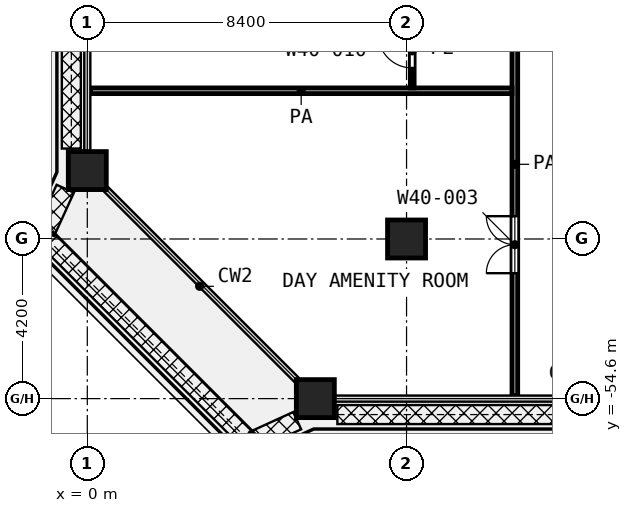
"""IFC4 building model, lengths in metres.
Left out: names, types, materials, properties, quantities, classifications, styles, units other than length and angle.
Written with IfcOpenShell. Run it as: python <this file> out.ifc"""

import sys

from ifc_helpers import new_model, si_unit, direction, frame, frame_2d, origin, origin_2d, place, context, subcontext, project, spatial, rectangle, extrude, element, fill, save


model = new_model("IFC4")
c1 = context("Model", 3, precision=1e-05, world=origin(), true_north=direction((0.0, 1.0)))
c2 = subcontext(c1, "Body", "Model", "MODEL_VIEW")
j1 = project(units=[si_unit("LENGTHUNIT", "METRE"), si_unit("PLANEANGLEUNIT", "RADIAN")], contexts=[c1])
p1 = place(None, origin())
s1 = spatial("IfcSite", under=j1, at=p1, CompositionType="ELEMENT")
p2 = place(p1, origin())
s2 = spatial("IfcBuilding", under=s1, at=p2, CompositionType="ELEMENT")
p3 = place(p2, frame((0.0, 0.0, 196.2)))
s3 = spatial("IfcBuildingStorey", under=s2, at=p3, CompositionType="ELEMENT", Elevation=196.2)
for number, where, z_axis, x_axis in (
    (1, (0.0, -48.6, 0.0), (0.0, 0.0, 1.0), (1.0, 0.0, 0.0)),
    (2, (8.4, -50.4, 0.0), (0.0, 0.0, 1.0), (1.0, 0.0, 0.0)),
    (3, (6.0, -54.6, 0.0), (0.0, 0.0, 1.0), (1.0, 0.0, 0.0)),
):
    element("IfcColumn", number, at=place(p3, frame(where, z_axis=z_axis, x_axis=x_axis)), inside=s3, PredefinedType="COLUMN", context=c2, shape_type="SweptSolid", body=[
        extrude(rectangle(XDim=1.0, YDim=1.0, at=origin_2d()), origin(), (0.0, 0.0, 1.0), 4.2),
    ])
p4 = place(p3, frame((8.55, -46.425, 0.0), z_axis=(0.0, 0.0, 1.0), x_axis=(0.0, 1.0, 0.0)))
e4 = element("IfcWall", 4, at=p4, inside=s3, PredefinedType="PARTITIONING", context=c2, shape_type="SweptSolid", body=[
    extrude(rectangle(XDim=2.025, YDim=0.1, at=frame_2d((1.013, 0.0))), origin(), (0.0, 0.0, 1.0), 3.6),
])
p5 = place(p4, frame((0.525, 0.0, 0.0)))
e5 = element("IfcOpeningElement", 5, at=p5, cuts=e4, PredefinedType="OPENING", context=c2, shape_type="SweptSolid", body=[
    extrude(rectangle(XDim=0.9, YDim=2.1, at=frame_2d((0.45, 1.05))), frame((0.0, 0.06, 0.0), z_axis=(0.0, -1.0, 0.0), x_axis=(1.0, 0.0, 0.0)), (0.0, 0.0, 1.0), 0.12),
])
p6 = place(p3, frame((0.08, -46.5, 0.0), z_axis=(0.0, 0.0, 1.0), x_axis=(1.0, 0.0, 0.0)))
e6 = element("IfcWall", 6, at=p6, inside=s3, PredefinedType="PARTITIONING", context=c2, shape_type="SweptSolid", body=[
    extrude(rectangle(XDim=11.095, YDim=0.15, at=frame_2d((5.547, 0.0))), origin(), (0.0, 0.0, 1.0), 3.6),
])
p7 = place(p3, frame((11.25, -54.52, 0.0), z_axis=(0.0, 0.0, 1.0), x_axis=(0.0, 1.0, 0.0)))
e7 = element("IfcWall", 7, at=p7, inside=s3, PredefinedType="PARTITIONING", context=c2, shape_type="SweptSolid", body=[
    extrude(rectangle(XDim=12.17, YDim=0.15, at=frame_2d((6.085, 0.0))), origin(), (0.0, 0.0, 1.0), 3.6),
])
p8 = place(p7, frame((3.22, 0.0, 0.0)))
e8 = element("IfcOpeningElement", 8, at=p8, cuts=e7, PredefinedType="OPENING", context=c2, shape_type="SweptSolid", body=[
    extrude(rectangle(XDim=1.5, YDim=2.1, at=frame_2d((0.75, 1.05))), frame((0.0, 0.085, 0.0), z_axis=(0.0, -1.0, 0.0), x_axis=(1.0, 0.0, 0.0)), (0.0, 0.0, 1.0), 0.17),
])
p9 = place(p5, origin())
e9 = element("IfcDoor", 9, at=p9, inside=s3, OperationType="SINGLE_SWING_RIGHT", PredefinedType="DOOR", context=c2, shape_type="SweptSolid", body=[
    extrude(rectangle(XDim=0.9, YDim=2.1, at=frame_2d((0.45, 1.05))), frame((0.0, 0.025, 0.0), z_axis=(0.0, -1.0, 0.0), x_axis=(1.0, 0.0, 0.0)), (0.0, 0.0, 1.0), 0.05),
])
fill(e5, e9)
p10 = place(p8, origin())
e10 = element("IfcDoor", 10, at=p10, inside=s3, OperationType="DOUBLE_DOOR_SINGLE_SWING", PredefinedType="DOOR", context=c2, shape_type="SweptSolid", body=[
    extrude(rectangle(XDim=1.5, YDim=2.1, at=frame_2d((0.75, 1.05))), frame((0.0, 0.025, 0.0), z_axis=(0.0, -1.0, 0.0), x_axis=(1.0, 0.0, 0.0)), (0.0, 0.0, 1.0), 0.05),
])
fill(e8, e10)
save(model, sys.argv[1])
